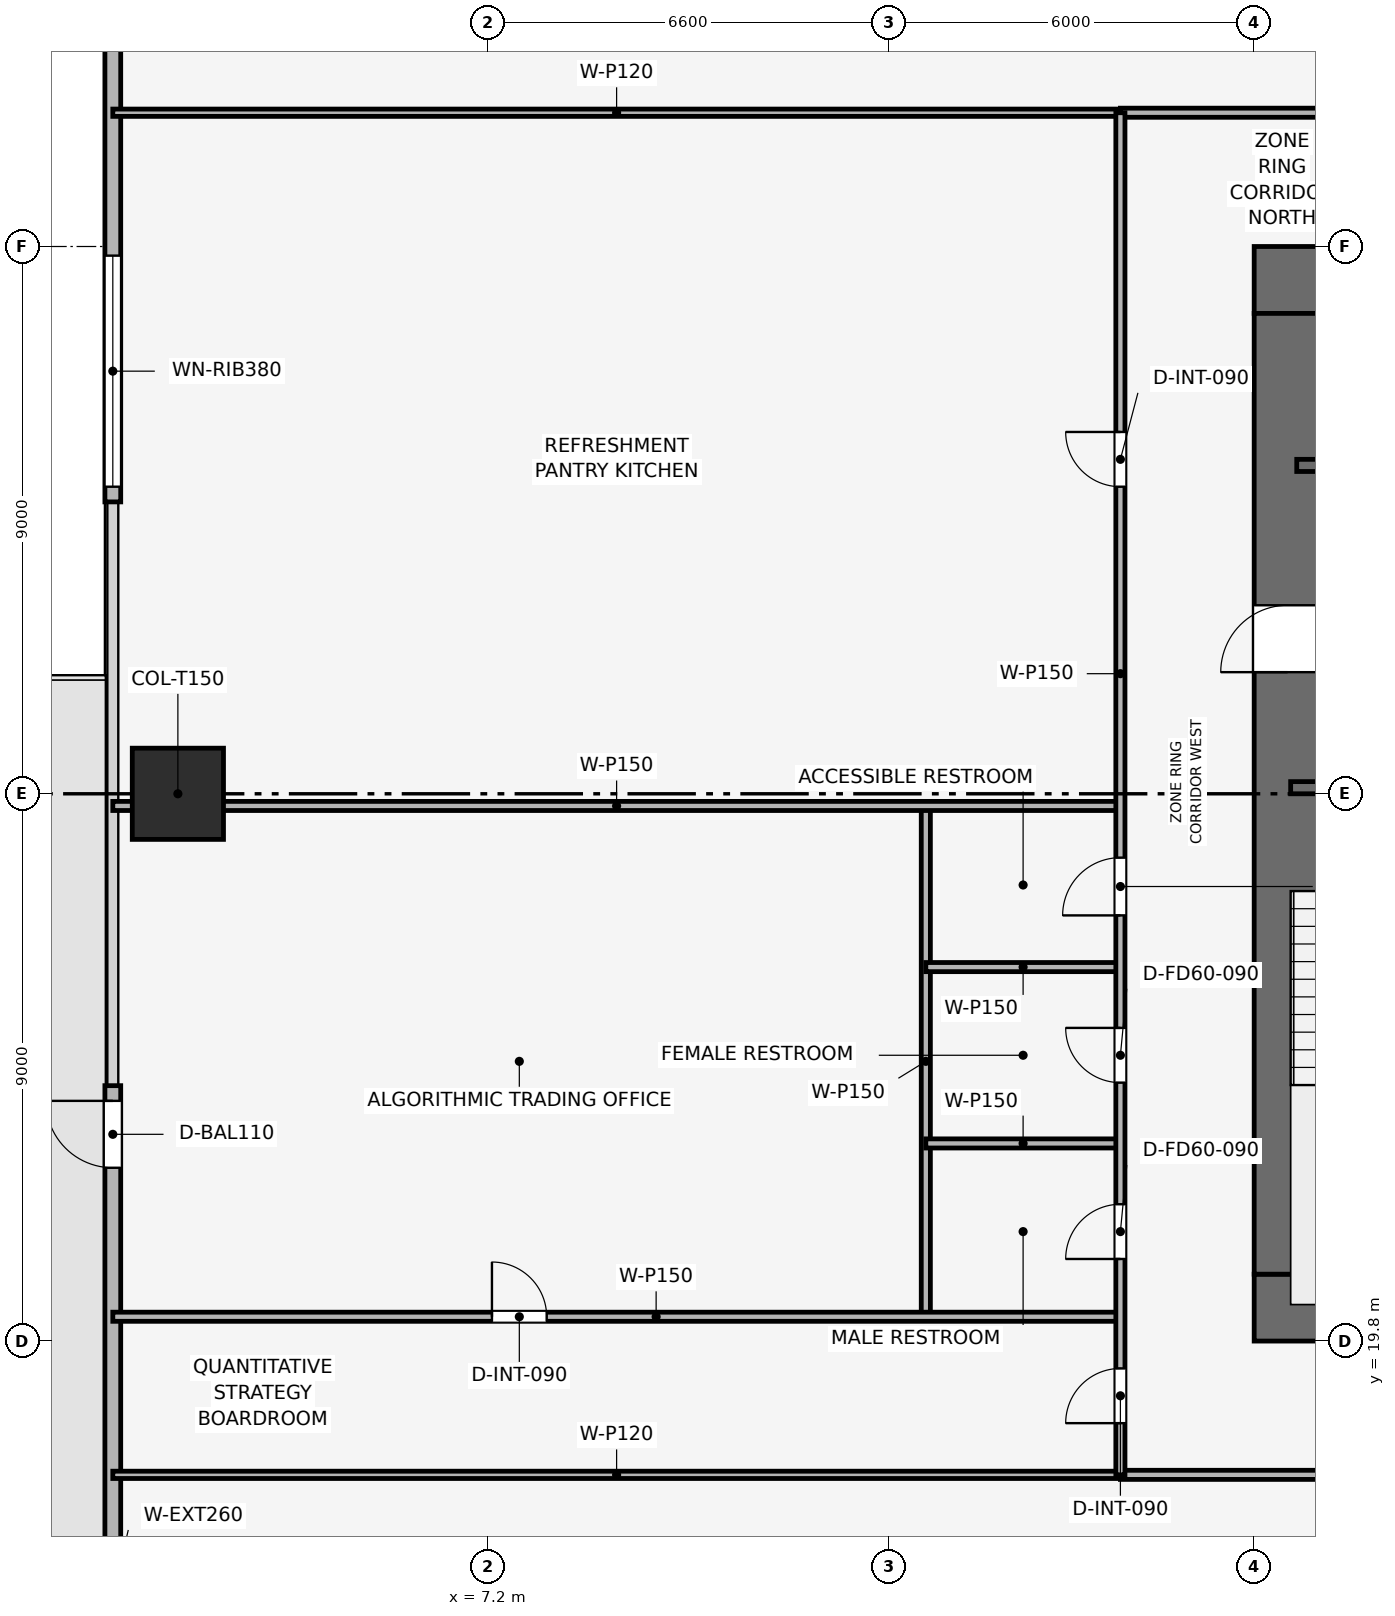
"""IFC4 building model, lengths in metres.
Left out: names, types, materials, properties, quantities, classifications, styles, units other than length and angle.
Written with IfcOpenShell. Run it as: python <this file> out.ifc"""

import sys

from ifc_helpers import new_model, si_unit, direction, frame, frame_2d, origin, origin_2d, place, context, subcontext, project, spatial, rectangle, extrude, element, fill, save


model = new_model("IFC4")
c1 = context("Model", 3, precision=1e-05, world=origin(), true_north=direction((0.0, 1.0)))
c2 = subcontext(c1, "Body", "Model", "MODEL_VIEW")
j1 = project(units=[si_unit("LENGTHUNIT", "METRE"), si_unit("PLANEANGLEUNIT", "RADIAN")], contexts=[c1])
p1 = place(None, origin())
s1 = spatial("IfcSite", under=j1, at=p1, CompositionType="ELEMENT")
p2 = place(p1, origin())
s2 = spatial("IfcBuilding", under=s1, at=p2, CompositionType="ELEMENT")
p3 = place(p2, frame((0.0, 0.0, 57.3)))
s3 = spatial("IfcBuildingStorey", under=s2, at=p3, CompositionType="ELEMENT", Elevation=57.3)
p4 = place(p3, frame((19.8, 20.35, 0.0), z_axis=(0.0, 0.0, 1.0), x_axis=(1.0, 0.0, 0.0)))
e1 = element("IfcWall", 1, at=p4, inside=s3, PredefinedType="SHEAR", context=c2, shape_type="SweptSolid", body=[
    extrude(rectangle(XDim=18.0, YDim=1.1, at=frame_2d((9.0, 0.0))), origin(), (0.0, 0.0, 1.0), 3.9),
])
p5 = place(p4, frame((8.4, 0.0, 0.0)))
e2 = element("IfcOpeningElement", 2, at=p5, cuts=e1, PredefinedType="OPENING", context=c2, shape_type="SweptSolid", body=[
    extrude(rectangle(XDim=1.2, YDim=2.2, at=frame_2d((0.6, 1.1))), frame((0.0, 0.56, 0.0), z_axis=(0.0, -1.0, 0.0), x_axis=(1.0, 0.0, 0.0)), (0.0, 0.0, 1.0), 1.12),
])
p6 = place(p3, frame((19.8, 37.25, 0.0), z_axis=(0.0, 0.0, 1.0), x_axis=(1.0, 0.0, 0.0)))
e3 = element("IfcWall", 3, at=p6, inside=s3, PredefinedType="SHEAR", context=c2, shape_type="SweptSolid", body=[
    extrude(rectangle(XDim=18.0, YDim=1.1, at=frame_2d((9.0, 0.0))), origin(), (0.0, 0.0, 1.0), 3.9),
])
p7 = place(p6, frame((7.05, 0.0, 0.0)))
e4 = element("IfcOpeningElement", 4, at=p7, cuts=e3, PredefinedType="OPENING", context=c2, shape_type="SweptSolid", body=[
    extrude(rectangle(XDim=1.1, YDim=2.15, at=frame_2d((0.55, 1.075))), frame((0.0, 0.56, 0.0), z_axis=(0.0, -1.0, 0.0), x_axis=(1.0, 0.0, 0.0)), (0.0, 0.0, 1.0), 1.12),
])
p8 = place(p3, frame((20.35, 20.9, 0.0), z_axis=(0.0, 0.0, 1.0), x_axis=(0.0, 1.0, 0.0)))
e5 = element("IfcWall", 5, at=p8, inside=s3, PredefinedType="SHEAR", context=c2, shape_type="SweptSolid", body=[
    extrude(rectangle(XDim=15.8, YDim=1.1, at=frame_2d((7.9, 0.0))), origin(), (0.0, 0.0, 1.0), 3.9),
])
p9 = place(p8, frame((9.9, 0.0, 0.0)))
e6 = element("IfcOpeningElement", 6, at=p9, cuts=e5, PredefinedType="OPENING", context=c2, shape_type="SweptSolid", body=[
    extrude(rectangle(XDim=1.1, YDim=2.15, at=frame_2d((0.55, 1.075))), frame((0.0, 0.56, 0.0), z_axis=(0.0, -1.0, 0.0), x_axis=(1.0, 0.0, 0.0)), (0.0, 0.0, 1.0), 1.12),
])
p10 = place(p3, frame((2.1, 28.8, 0.003), z_axis=(0.0, 0.0, 1.0), x_axis=(1.0, 0.0, 0.0)))
e7 = element("IfcColumn", 7, at=p10, inside=s3, PredefinedType="COLUMN", context=c2, shape_type="SweptSolid", body=[
    extrude(rectangle(XDim=1.5, YDim=1.5, at=origin_2d()), origin(), (0.0, 0.0, 1.0), 3.644),
])
p11 = place(p3, frame((1.03, 8.7, 0.0), z_axis=(0.0, 0.0, 1.0), x_axis=(0.0, 1.0, 0.0)))
e8 = element("IfcWall", 8, at=p11, inside=s3, PredefinedType="SOLIDWALL", context=c2, shape_type="SweptSolid", body=[
    extrude(rectangle(XDim=15.3, YDim=0.26, at=frame_2d((7.65, 0.0))), origin(), (0.0, 0.0, 1.0), 3.65),
])
p12 = place(p11, frame((13.95, 0.0, 0.0)))
e9 = element("IfcOpeningElement", 9, at=p12, cuts=e8, PredefinedType="OPENING", context=c2, shape_type="SweptSolid", body=[
    extrude(rectangle(XDim=1.1, YDim=2.2, at=frame_2d((0.55, 1.1))), frame((0.0, 0.14, 0.0), z_axis=(0.0, -1.0, 0.0), x_axis=(1.0, 0.0, 0.0)), (0.0, 0.0, 1.0), 0.28),
])
p13 = place(p3, frame((1.03, 33.6, 0.0), z_axis=(0.0, 0.0, 1.0), x_axis=(0.0, 1.0, 0.0)))
e10 = element("IfcWall", 10, at=p13, inside=s3, PredefinedType="SOLIDWALL", context=c2, shape_type="SweptSolid", body=[
    extrude(rectangle(XDim=15.3, YDim=0.26, at=frame_2d((7.65, 0.0))), origin(), (0.0, 0.0, 1.0), 3.65),
])
p14 = place(p13, frame((0.25, 0.0, 0.9)))
e11 = element("IfcOpeningElement", 11, at=p14, cuts=e10, PredefinedType="OPENING", context=c2, shape_type="SweptSolid", body=[
    extrude(rectangle(XDim=3.8, YDim=1.9, at=frame_2d((1.9, 0.95))), frame((0.0, 0.14, 0.0), z_axis=(0.0, -1.0, 0.0), x_axis=(1.0, 0.0, 0.0)), (0.0, 0.0, 1.0), 0.28),
])
p15 = place(p3, frame((20.4, 28.9, 0.0), z_axis=(0.0, 0.0, 1.0), x_axis=(1.0, 0.0, 0.0)))
e12 = element("IfcWall", 12, at=p15, inside=s3, PredefinedType="SHEAR", context=c2, shape_type="SweptSolid", body=[
    extrude(rectangle(XDim=3.15, YDim=0.2, at=frame_2d((1.575, 0.0))), origin(), (0.0, 0.0, 1.0), 3.65),
])
p16 = place(p15, frame((0.8, 0.0, 0.0)))
e13 = element("IfcOpeningElement", 13, at=p16, cuts=e12, PredefinedType="OPENING", context=c2, shape_type="SweptSolid", body=[
    extrude(rectangle(XDim=1.0, YDim=2.1, at=frame_2d((0.5, 1.05))), frame((0.0, 0.11, 0.0), z_axis=(0.0, -1.0, 0.0), x_axis=(1.0, 0.0, 0.0)), (0.0, 0.0, 1.0), 0.22),
])
p17 = place(p3, frame((20.5, 34.2, 0.0), z_axis=(0.0, 0.0, 1.0), x_axis=(1.0, 0.0, 0.0)))
e14 = element("IfcWall", 14, at=p17, inside=s3, PredefinedType="SHEAR", context=c2, shape_type="SweptSolid", body=[
    extrude(rectangle(XDim=3.05, YDim=0.2, at=frame_2d((1.525, 0.0))), origin(), (0.0, 0.0, 1.0), 3.65),
])
p18 = place(p17, frame((0.75, 0.0, 0.0)))
e15 = element("IfcOpeningElement", 15, at=p18, cuts=e14, PredefinedType="OPENING", context=c2, shape_type="SweptSolid", body=[
    extrude(rectangle(XDim=1.1, YDim=2.15, at=frame_2d((0.55, 1.075))), frame((0.0, 0.11, 0.0), z_axis=(0.0, -1.0, 0.0), x_axis=(1.0, 0.0, 0.0)), (0.0, 0.0, 1.0), 0.22),
])
for number, where, z_axis, x_axis in (
    (16, (1.03, 17.6, 0.0), (0.0, 0.0, 1.0), (1.0, 0.0, 0.0)),
    (17, (1.03, 40.0, 0.0), (0.0, 0.0, 1.0), (1.0, 0.0, 0.0)),
):
    element("IfcWall", number, at=place(p3, frame(where, z_axis=z_axis, x_axis=x_axis)), inside=s3, PredefinedType="PARTITIONING", context=c2, shape_type="SweptSolid", body=[
        extrude(rectangle(XDim=16.57, YDim=0.12, at=frame_2d((8.285, 0.0))), origin(), (0.0, 0.0, 1.0), 2.935),
    ])
p19 = place(p3, frame((14.4, 20.2, 0.0), z_axis=(0.0, 0.0, 1.0), x_axis=(0.0, 1.0, 0.0)))
e18 = element("IfcWall", 18, at=p19, inside=s3, PredefinedType="PARTITIONING", context=c2, shape_type="SweptSolid", body=[
    extrude(rectangle(XDim=8.4, YDim=0.15, at=frame_2d((4.2, 0.0))), origin(), (0.0, 0.0, 1.0), 3.085),
])
p20 = place(p3, frame((1.03, 20.2, 0.0), z_axis=(0.0, 0.0, 1.0), x_axis=(1.0, 0.0, 0.0)))
e19 = element("IfcWall", 19, at=p20, inside=s3, PredefinedType="PARTITIONING", context=c2, shape_type="SweptSolid", body=[
    extrude(rectangle(XDim=16.57, YDim=0.15, at=frame_2d((8.285, 0.0))), origin(), (0.0, 0.0, 1.0), 2.935),
])
p21 = place(p20, frame((6.235, 0.0, 0.0)))
e20 = element("IfcOpeningElement", 20, at=p21, cuts=e19, PredefinedType="OPENING", context=c2, shape_type="SweptSolid", body=[
    extrude(rectangle(XDim=0.9, YDim=2.1, at=frame_2d((0.45, 1.05))), frame((0.0, 0.085, 0.0), z_axis=(0.0, -1.0, 0.0), x_axis=(1.0, 0.0, 0.0)), (0.0, 0.0, 1.0), 0.17),
])
p22 = place(p3, frame((1.03, 28.6, 0.0), z_axis=(0.0, 0.0, 1.0), x_axis=(1.0, 0.0, 0.0)))
e21 = element("IfcWall", 21, at=p22, inside=s3, PredefinedType="PARTITIONING", context=c2, shape_type="SweptSolid", body=[
    extrude(rectangle(XDim=16.57, YDim=0.15, at=frame_2d((8.285, 0.0))), origin(), (0.0, 0.0, 1.0), 2.935),
])
for number, where, z_axis, x_axis in (
    (22, (14.4, 23.05, 0.0), (0.0, 0.0, 1.0), (1.0, 0.0, 0.0)),
    (23, (14.4, 25.95, 0.0), (0.0, 0.0, 1.0), (1.0, 0.0, 0.0)),
):
    element("IfcWall", number, at=place(p3, frame(where, z_axis=z_axis, x_axis=x_axis)), inside=s3, PredefinedType="PARTITIONING", context=c2, shape_type="SweptSolid", body=[
        extrude(rectangle(XDim=3.2, YDim=0.15, at=frame_2d((1.6, 0.0))), origin(), (0.0, 0.0, 1.0), 3.65),
    ])
p23 = place(p3, frame((17.6, 17.6, 0.0), z_axis=(0.0, 0.0, 1.0), x_axis=(1.0, 0.0, 0.0)))
e24 = element("IfcWall", 24, at=p23, inside=s3, PredefinedType="PARTITIONING", context=c2, shape_type="SweptSolid", body=[
    extrude(rectangle(XDim=22.4, YDim=0.15, at=frame_2d((11.2, 0.0))), origin(), (0.0, 0.0, 1.0), 3.085),
])
p24 = place(p23, frame((10.75, 0.0, 0.0)))
e25 = element("IfcOpeningElement", 25, at=p24, cuts=e24, PredefinedType="OPENING", context=c2, shape_type="SweptSolid", body=[
    extrude(rectangle(XDim=0.9, YDim=2.1, at=frame_2d((0.45, 1.05))), frame((0.0, 0.085, 0.0), z_axis=(0.0, -1.0, 0.0), x_axis=(1.0, 0.0, 0.0)), (0.0, 0.0, 1.0), 0.17),
])
p25 = place(p3, frame((17.6, 40.0, 0.0), z_axis=(0.0, 0.0, 1.0), x_axis=(1.0, 0.0, 0.0)))
e26 = element("IfcWall", 26, at=p25, inside=s3, PredefinedType="PARTITIONING", context=c2, shape_type="SweptSolid", body=[
    extrude(rectangle(XDim=22.4, YDim=0.15, at=frame_2d((11.2, 0.0))), origin(), (0.0, 0.0, 1.0), 3.085),
])
p26 = place(p25, frame((4.349, 0.0, 0.0)))
e27 = element("IfcOpeningElement", 27, at=p26, cuts=e26, PredefinedType="OPENING", context=c2, shape_type="SweptSolid", body=[
    extrude(rectangle(XDim=0.9, YDim=2.1, at=frame_2d((0.45, 1.05))), frame((0.0, 0.085, 0.0), z_axis=(0.0, -1.0, 0.0), x_axis=(1.0, 0.0, 0.0)), (0.0, 0.0, 1.0), 0.17),
])
p27 = place(p25, frame((15.549, 0.0, 0.0)))
e28 = element("IfcOpeningElement", 28, at=p27, cuts=e26, PredefinedType="OPENING", context=c2, shape_type="SweptSolid", body=[
    extrude(rectangle(XDim=0.9, YDim=2.1, at=frame_2d((0.45, 1.05))), frame((0.0, 0.085, 0.0), z_axis=(0.0, -1.0, 0.0), x_axis=(1.0, 0.0, 0.0)), (0.0, 0.0, 1.0), 0.17),
])
p28 = place(p3, frame((17.6, 17.6, 0.0), z_axis=(0.0, 0.0, 1.0), x_axis=(0.0, 1.0, 0.0)))
e29 = element("IfcWall", 29, at=p28, inside=s3, PredefinedType="PARTITIONING", context=c2, shape_type="SweptSolid", body=[
    extrude(rectangle(XDim=22.4, YDim=0.15, at=frame_2d((11.2, 0.0))), origin(), (0.0, 0.0, 1.0), 3.085),
])
p29 = place(p28, frame((0.85, 0.0, 0.0)))
e30 = element("IfcOpeningElement", 30, at=p29, cuts=e29, PredefinedType="OPENING", context=c2, shape_type="SweptSolid", body=[
    extrude(rectangle(XDim=0.9, YDim=2.1, at=frame_2d((0.45, 1.05))), frame((0.0, 0.085, 0.0), z_axis=(0.0, -1.0, 0.0), x_axis=(1.0, 0.0, 0.0)), (0.0, 0.0, 1.0), 0.17),
])
p30 = place(p28, frame((3.55, 0.0, 0.0)))
e31 = element("IfcOpeningElement", 31, at=p30, cuts=e29, PredefinedType="OPENING", context=c2, shape_type="SweptSolid", body=[
    extrude(rectangle(XDim=0.9, YDim=2.1, at=frame_2d((0.45, 1.05))), frame((0.0, 0.085, 0.0), z_axis=(0.0, -1.0, 0.0), x_axis=(1.0, 0.0, 0.0)), (0.0, 0.0, 1.0), 0.17),
])
p31 = place(p28, frame((6.45, 0.0, 0.0)))
e32 = element("IfcOpeningElement", 32, at=p31, cuts=e29, PredefinedType="OPENING", context=c2, shape_type="SweptSolid", body=[
    extrude(rectangle(XDim=0.9, YDim=2.1, at=frame_2d((0.45, 1.05))), frame((0.0, 0.085, 0.0), z_axis=(0.0, -1.0, 0.0), x_axis=(1.0, 0.0, 0.0)), (0.0, 0.0, 1.0), 0.17),
])
p32 = place(p28, frame((9.2, 0.0, 0.0)))
e33 = element("IfcOpeningElement", 33, at=p32, cuts=e29, PredefinedType="OPENING", context=c2, shape_type="SweptSolid", body=[
    extrude(rectangle(XDim=0.95, YDim=2.1, at=frame_2d((0.475, 1.05))), frame((0.0, 0.085, 0.0), z_axis=(0.0, -1.0, 0.0), x_axis=(1.0, 0.0, 0.0)), (0.0, 0.0, 1.0), 0.17),
])
p33 = place(p28, frame((16.25, 0.0, 0.0)))
e34 = element("IfcOpeningElement", 34, at=p33, cuts=e29, PredefinedType="OPENING", context=c2, shape_type="SweptSolid", body=[
    extrude(rectangle(XDim=0.9, YDim=2.1, at=frame_2d((0.45, 1.05))), frame((0.0, 0.085, 0.0), z_axis=(0.0, -1.0, 0.0), x_axis=(1.0, 0.0, 0.0)), (0.0, 0.0, 1.0), 0.17),
])
p34 = place(p12, origin())
e35 = element("IfcDoor", 35, at=p34, inside=s3, OperationType="SINGLE_SWING_RIGHT", PredefinedType="DOOR", context=c2, shape_type="SweptSolid", body=[
    extrude(rectangle(XDim=1.1, YDim=2.2, at=frame_2d((0.55, 1.1))), frame((0.0, 0.025, 0.0), z_axis=(0.0, -1.0, 0.0), x_axis=(1.0, 0.0, 0.0)), (0.0, 0.0, 1.0), 0.05),
])
fill(e9, e35)
p35 = place(p14, origin())
e36 = element("IfcWindow", 36, at=p35, inside=s3, PartitioningType="SINGLE_PANEL", PredefinedType="WINDOW", context=c2, shape_type="SweptSolid", body=[
    extrude(rectangle(XDim=3.8, YDim=1.9, at=frame_2d((1.9, 0.95))), frame((0.0, 0.03, 0.0), z_axis=(0.0, -1.0, 0.0), x_axis=(1.0, 0.0, 0.0)), (0.0, 0.0, 1.0), 0.06),
])
fill(e11, e36)
p36 = place(p21, origin())
e37 = element("IfcDoor", 37, at=p36, inside=s3, OperationType="SINGLE_SWING_LEFT", PredefinedType="DOOR", context=c2, shape_type="SweptSolid", body=[
    extrude(rectangle(XDim=0.9, YDim=2.1, at=frame_2d((0.45, 1.05))), frame((0.0, 0.025, 0.0), z_axis=(0.0, -1.0, 0.0), x_axis=(1.0, 0.0, 0.0)), (0.0, 0.0, 1.0), 0.05),
])
fill(e20, e37)
p37 = place(p29, origin())
e38 = element("IfcDoor", 38, at=p37, inside=s3, OperationType="SINGLE_SWING_LEFT", PredefinedType="DOOR", context=c2, shape_type="SweptSolid", body=[
    extrude(rectangle(XDim=0.9, YDim=2.1, at=frame_2d((0.45, 1.05))), frame((0.0, 0.025, 0.0), z_axis=(0.0, -1.0, 0.0), x_axis=(1.0, 0.0, 0.0)), (0.0, 0.0, 1.0), 0.05),
])
fill(e30, e38)
p38 = place(p30, origin())
e39 = element("IfcDoor", 39, at=p38, inside=s3, OperationType="SINGLE_SWING_LEFT", PredefinedType="DOOR", context=c2, shape_type="SweptSolid", body=[
    extrude(rectangle(XDim=0.9, YDim=2.1, at=frame_2d((0.45, 1.05))), frame((0.0, 0.025, 0.0), z_axis=(0.0, -1.0, 0.0), x_axis=(1.0, 0.0, 0.0)), (0.0, 0.0, 1.0), 0.05),
])
fill(e31, e39)
p39 = place(p31, origin())
e40 = element("IfcDoor", 40, at=p39, inside=s3, OperationType="SINGLE_SWING_RIGHT", PredefinedType="DOOR", context=c2, shape_type="SweptSolid", body=[
    extrude(rectangle(XDim=0.9, YDim=2.1, at=frame_2d((0.45, 1.05))), frame((0.0, 0.025, 0.0), z_axis=(0.0, -1.0, 0.0), x_axis=(1.0, 0.0, 0.0)), (0.0, 0.0, 1.0), 0.05),
])
fill(e32, e40)
p40 = place(p32, origin())
e41 = element("IfcDoor", 41, at=p40, inside=s3, OperationType="SINGLE_SWING_LEFT", PredefinedType="DOOR", context=c2, shape_type="SweptSolid", body=[
    extrude(rectangle(XDim=0.95, YDim=2.1, at=frame_2d((0.475, 1.05))), frame((0.0, 0.025, 0.0), z_axis=(0.0, -1.0, 0.0), x_axis=(1.0, 0.0, 0.0)), (0.0, 0.0, 1.0), 0.05),
])
fill(e33, e41)
p41 = place(p33, origin())
e42 = element("IfcDoor", 42, at=p41, inside=s3, OperationType="SINGLE_SWING_RIGHT", PredefinedType="DOOR", context=c2, shape_type="SweptSolid", body=[
    extrude(rectangle(XDim=0.9, YDim=2.1, at=frame_2d((0.45, 1.05))), frame((0.0, 0.025, 0.0), z_axis=(0.0, -1.0, 0.0), x_axis=(1.0, 0.0, 0.0)), (0.0, 0.0, 1.0), 0.05),
])
fill(e34, e42)
p42 = place(p9, origin())
e43 = element("IfcDoor", 43, at=p42, inside=s3, OperationType="SINGLE_SWING_LEFT", PredefinedType="DOOR", context=c2, shape_type="SweptSolid", body=[
    extrude(rectangle(XDim=1.1, YDim=2.15, at=frame_2d((0.55, 1.075))), frame((0.0, 0.025, 0.0), z_axis=(0.0, -1.0, 0.0), x_axis=(1.0, 0.0, 0.0)), (0.0, 0.0, 1.0), 0.05),
])
fill(e6, e43)
save(model, sys.argv[1])
